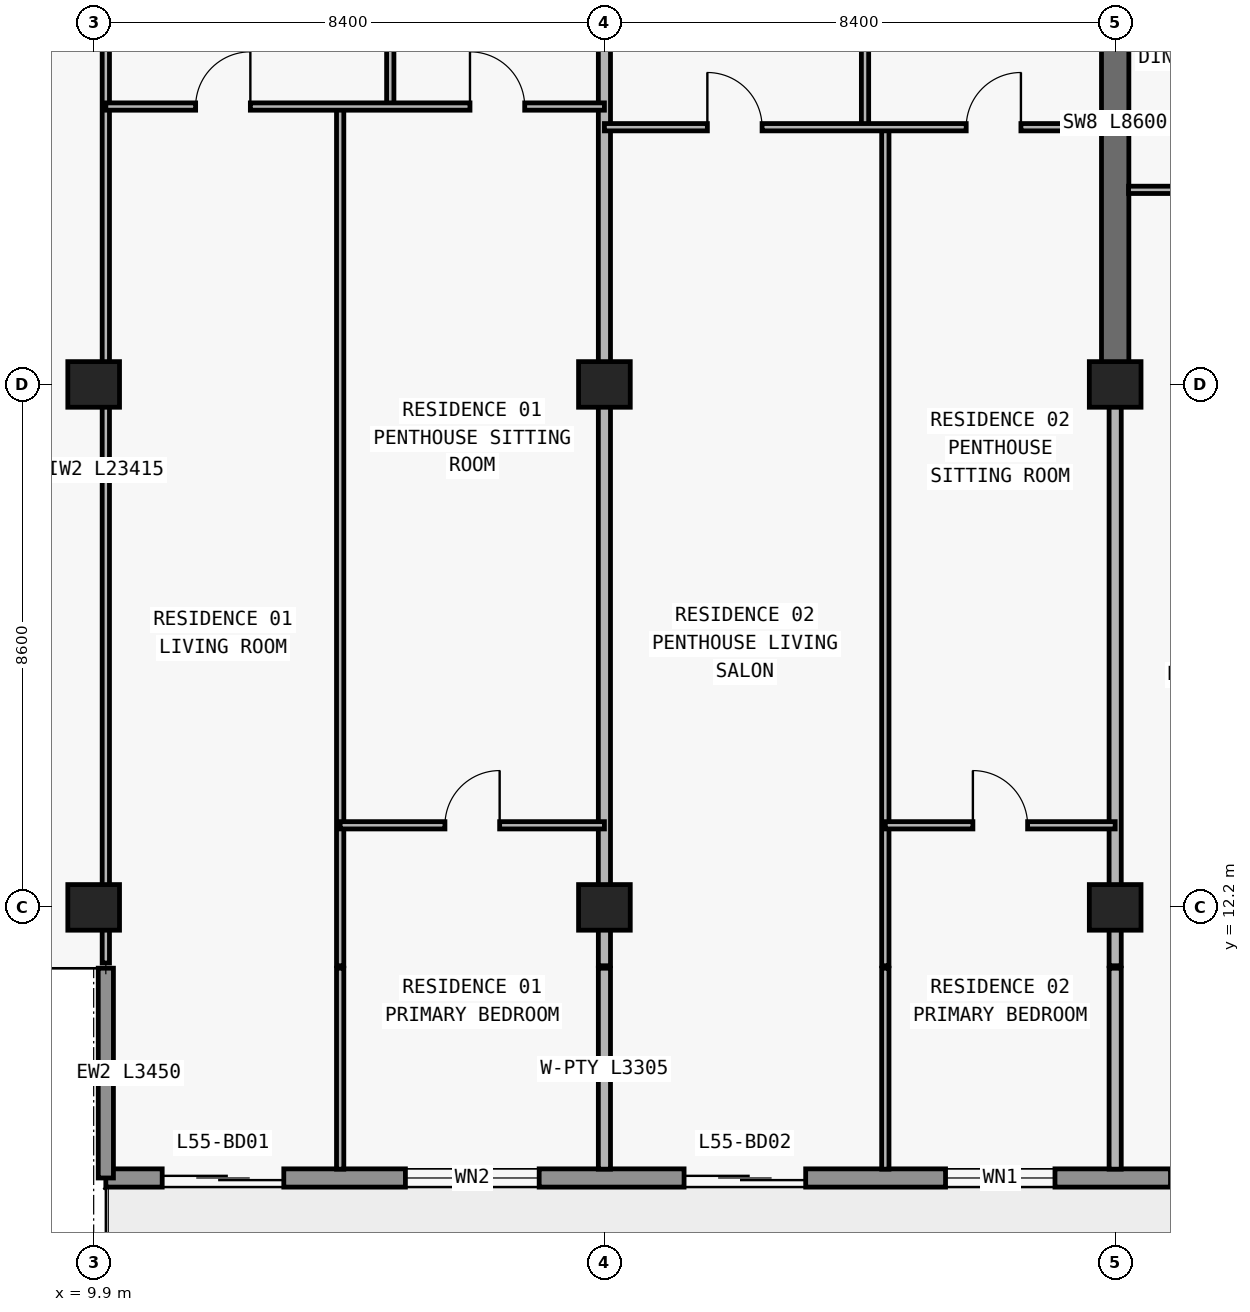
"""IFC4 building model, lengths in metres.
Left out: names, types, materials, properties, quantities, classifications, styles, units other than length and angle.
Written with IfcOpenShell. Run it as: python <this file> out.ifc"""

import sys

from ifc_helpers import new_model, si_unit, direction, frame, frame_2d, origin, origin_2d, place, context, subcontext, project, spatial, rectangle, extrude, element, fill, save


model = new_model("IFC4")
c1 = context("Model", 3, precision=1e-05, world=origin(), true_north=direction((0.0, 1.0)))
c2 = subcontext(c1, "Body", "Model", "MODEL_VIEW")
j1 = project(units=[si_unit("LENGTHUNIT", "METRE"), si_unit("PLANEANGLEUNIT", "RADIAN")], contexts=[c1])
p1 = place(None, origin())
s1 = spatial("IfcSite", under=j1, at=p1, CompositionType="ELEMENT")
p2 = place(p1, origin())
s2 = spatial("IfcBuilding", under=s1, at=p2, CompositionType="ELEMENT")
p3 = place(p2, frame((0.0, 0.0, 198.3)))
s3 = spatial("IfcBuildingStorey", under=s2, at=p3, CompositionType="ELEMENT", Elevation=198.3)
for number, where, z_axis, x_axis in (
    (1, (9.9, 12.2, 0.0), (0.0, 0.0, 1.0), (1.0, 0.0, 0.0)),
    (2, (18.3, 12.2, 0.0), (0.0, 0.0, 1.0), (1.0, 0.0, 0.0)),
    (3, (26.7, 12.2, 0.0), (0.0, 0.0, 1.0), (1.0, 0.0, 0.0)),
    (4, (9.9, 20.8, 0.0), (0.0, 0.0, 1.0), (1.0, 0.0, 0.0)),
    (5, (18.3, 20.8, 0.0), (0.0, 0.0, 1.0), (1.0, 0.0, 0.0)),
    (6, (26.7, 20.8, 0.0), (0.0, 0.0, 1.0), (1.0, 0.0, 0.0)),
):
    element("IfcColumn", number, at=place(p3, frame(where, z_axis=z_axis, x_axis=x_axis)), inside=s3, PredefinedType="COLUMN", context=c2, shape_type="SweptSolid", body=[
        extrude(rectangle(XDim=0.85, YDim=0.75, at=origin_2d()), origin(), (0.0, 0.0, 1.0), 3.05),
    ])
p4 = place(p3, frame((26.7, 20.8, 0.0), z_axis=(0.0, 0.0, 1.0), x_axis=(0.0, 1.0, 0.0)))
e7 = element("IfcWall", 7, at=p4, inside=s3, PredefinedType="SHEAR", context=c2, shape_type="SweptSolid", body=[
    extrude(rectangle(XDim=8.6, YDim=0.45, at=frame_2d((4.3, 0.0))), origin(), (0.0, 0.0, 1.0), 3.05),
])
p5 = place(p3, frame((67.7, 7.75, 0.0), z_axis=(0.0, 0.0, 1.0), x_axis=(-1.0, 0.0, 0.0)))
e8 = element("IfcWall", 8, at=p5, inside=s3, PredefinedType="STANDARD", context=c2, shape_type="SweptSolid", body=[
    extrude(rectangle(XDim=57.6, YDim=0.3, at=frame_2d((28.8, 0.0))), origin(), (0.0, 0.0, 1.0), 3.05),
])
p6 = place(p5, frame((54.673, 0.0, 0.0)))
e9 = element("IfcOpeningElement", 9, at=p6, cuts=e8, PredefinedType="OPENING", context=c2, shape_type="SweptSolid", body=[
    extrude(rectangle(XDim=2.0, YDim=2.3, at=frame_2d((1.0, 1.15))), frame((0.0, 0.16, 0.0), z_axis=(0.0, -1.0, 0.0), x_axis=(1.0, 0.0, 0.0)), (0.0, 0.0, 1.0), 0.32),
])
p7 = place(p5, frame((50.473, 0.0, 0.85)))
e10 = element("IfcOpeningElement", 10, at=p7, cuts=e8, PredefinedType="OPENING", context=c2, shape_type="SweptSolid", body=[
    extrude(rectangle(XDim=2.2, YDim=1.55, at=frame_2d((1.1, 0.775))), frame((0.0, 0.16, 0.0), z_axis=(0.0, -1.0, 0.0), x_axis=(1.0, 0.0, 0.0)), (0.0, 0.0, 1.0), 0.32),
])
p8 = place(p5, frame((46.09, 0.0, 0.0)))
e11 = element("IfcOpeningElement", 11, at=p8, cuts=e8, PredefinedType="OPENING", context=c2, shape_type="SweptSolid", body=[
    extrude(rectangle(XDim=2.0, YDim=2.3, at=frame_2d((1.0, 1.15))), frame((0.0, 0.16, 0.0), z_axis=(0.0, -1.0, 0.0), x_axis=(1.0, 0.0, 0.0)), (0.0, 0.0, 1.0), 0.32),
])
p9 = place(p5, frame((41.99, 0.0, 0.85)))
e12 = element("IfcOpeningElement", 12, at=p9, cuts=e8, PredefinedType="OPENING", context=c2, shape_type="SweptSolid", body=[
    extrude(rectangle(XDim=1.8, YDim=1.55, at=frame_2d((0.9, 0.775))), frame((0.0, 0.16, 0.0), z_axis=(0.0, -1.0, 0.0), x_axis=(1.0, 0.0, 0.0)), (0.0, 0.0, 1.0), 0.32),
])
p10 = place(p5, frame((38.09, 0.0, 0.0)))
e13 = element("IfcOpeningElement", 13, at=p10, cuts=e8, PredefinedType="OPENING", context=c2, shape_type="SweptSolid", body=[
    extrude(rectangle(XDim=2.0, YDim=2.3, at=frame_2d((1.0, 1.15))), frame((0.0, 0.16, 0.0), z_axis=(0.0, -1.0, 0.0), x_axis=(1.0, 0.0, 0.0)), (0.0, 0.0, 1.0), 0.32),
])
p11 = place(p5, frame((33.41, 0.0, 0.65)))
e14 = element("IfcOpeningElement", 14, at=p11, cuts=e8, PredefinedType="OPENING", context=c2, shape_type="SweptSolid", body=[
    extrude(rectangle(XDim=2.6, YDim=1.85, at=frame_2d((1.3, 0.925))), frame((0.0, 0.16, 0.0), z_axis=(0.0, -1.0, 0.0), x_axis=(1.0, 0.0, 0.0)), (0.0, 0.0, 1.0), 0.32),
])
p12 = place(p5, frame((27.7, 0.0, 0.85)))
e15 = element("IfcOpeningElement", 15, at=p12, cuts=e8, PredefinedType="OPENING", context=c2, shape_type="SweptSolid", body=[
    extrude(rectangle(XDim=2.2, YDim=1.55, at=frame_2d((1.1, 0.775))), frame((0.0, 0.16, 0.0), z_axis=(0.0, -1.0, 0.0), x_axis=(1.0, 0.0, 0.0)), (0.0, 0.0, 1.0), 0.32),
])
p13 = place(p5, frame((19.7, 0.0, 0.85)))
e16 = element("IfcOpeningElement", 16, at=p13, cuts=e8, PredefinedType="OPENING", context=c2, shape_type="SweptSolid", body=[
    extrude(rectangle(XDim=2.2, YDim=1.55, at=frame_2d((1.1, 0.775))), frame((0.0, 0.16, 0.0), z_axis=(0.0, -1.0, 0.0), x_axis=(1.0, 0.0, 0.0)), (0.0, 0.0, 1.0), 0.32),
])
p14 = place(p5, frame((13.69, 0.0, 0.0)))
e17 = element("IfcOpeningElement", 17, at=p14, cuts=e8, PredefinedType="OPENING", context=c2, shape_type="SweptSolid", body=[
    extrude(rectangle(XDim=2.0, YDim=2.3, at=frame_2d((1.0, 1.15))), frame((0.0, 0.16, 0.0), z_axis=(0.0, -1.0, 0.0), x_axis=(1.0, 0.0, 0.0)), (0.0, 0.0, 1.0), 0.32),
])
p15 = place(p5, frame((9.01, 0.0, 0.65)))
e18 = element("IfcOpeningElement", 18, at=p15, cuts=e8, PredefinedType="OPENING", context=c2, shape_type="SweptSolid", body=[
    extrude(rectangle(XDim=2.6, YDim=1.85, at=frame_2d((1.3, 0.925))), frame((0.0, 0.16, 0.0), z_axis=(0.0, -1.0, 0.0), x_axis=(1.0, 0.0, 0.0)), (0.0, 0.0, 1.0), 0.32),
])
p16 = place(p5, frame((3.0, 0.0, 0.85)))
e19 = element("IfcOpeningElement", 19, at=p16, cuts=e8, PredefinedType="OPENING", context=c2, shape_type="SweptSolid", body=[
    extrude(rectangle(XDim=2.2, YDim=1.55, at=frame_2d((1.1, 0.775))), frame((0.0, 0.16, 0.0), z_axis=(0.0, -1.0, 0.0), x_axis=(1.0, 0.0, 0.0)), (0.0, 0.0, 1.0), 0.32),
])
p17 = place(p3, frame((10.1, 11.2, 0.0), z_axis=(0.0, 0.0, 1.0), x_axis=(0.0, -1.0, 0.0)))
e20 = element("IfcWall", 20, at=p17, inside=s3, PredefinedType="ELEMENTEDWALL", context=c2, shape_type="SweptSolid", body=[
    extrude(rectangle(XDim=3.45, YDim=0.25, at=frame_2d((1.725, 0.0))), origin(), (0.0, 0.0, 1.0), 3.05),
])
p18 = place(p3, frame((10.1, 11.285, 0.0), z_axis=(0.0, 0.0, 1.0), x_axis=(0.0, 1.0, 0.0)))
e21 = element("IfcWall", 21, at=p18, inside=s3, PredefinedType="PARTITIONING", context=c2, shape_type="SweptSolid", body=[
    extrude(rectangle(XDim=23.415, YDim=0.12, at=frame_2d((11.708, 0.0))), origin(), (0.0, 0.0, 1.0), 2.263),
])
p19 = place(p18, frame((16.21, 0.0, 0.0)))
e22 = element("IfcOpeningElement", 22, at=p19, cuts=e21, PredefinedType="OPENING", context=c2, shape_type="SweptSolid", body=[
    extrude(rectangle(XDim=0.9, YDim=2.15, at=frame_2d((0.45, 1.075))), frame((0.0, 0.07, 0.0), z_axis=(0.0, -1.0, 0.0), x_axis=(1.0, 0.0, 0.0)), (0.0, 0.0, 1.0), 0.14),
])
p20 = place(p3, frame((13.954, 7.895, 0.0), z_axis=(0.0, 0.0, 1.0), x_axis=(0.0, 1.0, 0.0)))
e23 = element("IfcWall", 23, at=p20, inside=s3, PredefinedType="PARTITIONING", context=c2, shape_type="SweptSolid", body=[
    extrude(rectangle(XDim=3.305, YDim=0.12, at=frame_2d((1.652, 0.0))), origin(), (0.0, 0.0, 1.0), 3.05),
])
p21 = place(p3, frame((13.954, 11.24, 0.0), z_axis=(0.0, 0.0, 1.0), x_axis=(0.0, 1.0, 0.0)))
e24 = element("IfcWall", 24, at=p21, inside=s3, PredefinedType="PARTITIONING", context=c2, shape_type="SweptSolid", body=[
    extrude(rectangle(XDim=14.13, YDim=0.12, at=frame_2d((7.065, 0.0))), origin(), (0.0, 0.0, 1.0), 2.725),
])
p22 = place(p3, frame((14.778, 25.37, 0.0), z_axis=(0.0, 0.0, 1.0), x_axis=(0.0, 1.0, 0.0)))
e25 = element("IfcWall", 25, at=p22, inside=s3, PredefinedType="PARTITIONING", context=c2, shape_type="SweptSolid", body=[
    extrude(rectangle(XDim=5.15, YDim=0.12, at=frame_2d((2.575, 0.0))), origin(), (0.0, 0.0, 1.0), 3.05),
])
p23 = place(p22, frame((2.125, 0.0, 0.0)))
e26 = element("IfcOpeningElement", 26, at=p23, cuts=e25, PredefinedType="OPENING", context=c2, shape_type="SweptSolid", body=[
    extrude(rectangle(XDim=0.9, YDim=2.15, at=frame_2d((0.45, 1.075))), frame((0.0, 0.07, 0.0), z_axis=(0.0, -1.0, 0.0), x_axis=(1.0, 0.0, 0.0)), (0.0, 0.0, 1.0), 0.14),
])
p24 = place(p3, frame((18.3, 7.895, 0.0), z_axis=(0.0, 0.0, 1.0), x_axis=(0.0, 1.0, 0.0)))
e27 = element("IfcWall", 27, at=p24, inside=s3, PredefinedType="PARTITIONING", context=c2, shape_type="SweptSolid", body=[
    extrude(rectangle(XDim=3.305, YDim=0.2, at=frame_2d((1.652, 0.0))), origin(), (0.0, 0.0, 1.0), 3.05),
])
p25 = place(p3, frame((18.3, 11.24, 0.0), z_axis=(0.0, 0.0, 1.0), x_axis=(0.0, 1.0, 0.0)))
e28 = element("IfcWall", 28, at=p25, inside=s3, PredefinedType="PARTITIONING", context=c2, shape_type="SweptSolid", body=[
    extrude(rectangle(XDim=23.46, YDim=0.2, at=frame_2d((11.73, 0.0))), origin(), (0.0, 0.0, 1.0), 2.263),
])
p26 = place(p3, frame((22.586, 25.03, 0.0), z_axis=(0.0, 0.0, 1.0), x_axis=(0.0, 1.0, 0.0)))
e29 = element("IfcWall", 29, at=p26, inside=s3, PredefinedType="PARTITIONING", context=c2, shape_type="SweptSolid", body=[
    extrude(rectangle(XDim=5.15, YDim=0.12, at=frame_2d((2.575, 0.0))), origin(), (0.0, 0.0, 1.0), 2.725),
])
p27 = place(p26, frame((2.125, 0.0, 0.0)))
e30 = element("IfcOpeningElement", 30, at=p27, cuts=e29, PredefinedType="OPENING", context=c2, shape_type="SweptSolid", body=[
    extrude(rectangle(XDim=0.9, YDim=2.15, at=frame_2d((0.45, 1.075))), frame((0.0, 0.07, 0.0), z_axis=(0.0, -1.0, 0.0), x_axis=(1.0, 0.0, 0.0)), (0.0, 0.0, 1.0), 0.14),
])
p28 = place(p3, frame((22.92, 7.895, 0.0), z_axis=(0.0, 0.0, 1.0), x_axis=(0.0, 1.0, 0.0)))
e31 = element("IfcWall", 31, at=p28, inside=s3, PredefinedType="PARTITIONING", context=c2, shape_type="SweptSolid", body=[
    extrude(rectangle(XDim=3.305, YDim=0.12, at=frame_2d((1.652, 0.0))), origin(), (0.0, 0.0, 1.0), 3.05),
])
p29 = place(p3, frame((22.92, 11.24, 0.0), z_axis=(0.0, 0.0, 1.0), x_axis=(0.0, 1.0, 0.0)))
e32 = element("IfcWall", 32, at=p29, inside=s3, PredefinedType="PARTITIONING", context=c2, shape_type="SweptSolid", body=[
    extrude(rectangle(XDim=13.79, YDim=0.12, at=frame_2d((6.895, 0.0))), origin(), (0.0, 0.0, 1.0), 3.05),
])
p30 = place(p3, frame((26.7, 7.895, 0.0), z_axis=(0.0, 0.0, 1.0), x_axis=(0.0, 1.0, 0.0)))
e33 = element("IfcWall", 33, at=p30, inside=s3, PredefinedType="PARTITIONING", context=c2, shape_type="SweptSolid", body=[
    extrude(rectangle(XDim=3.305, YDim=0.2, at=frame_2d((1.652, 0.0))), origin(), (0.0, 0.0, 1.0), 3.05),
])
p31 = place(p3, frame((26.7, 11.24, 0.0), z_axis=(0.0, 0.0, 1.0), x_axis=(0.0, 1.0, 0.0)))
e34 = element("IfcWall", 34, at=p31, inside=s3, PredefinedType="PARTITIONING", context=c2, shape_type="SweptSolid", body=[
    extrude(rectangle(XDim=9.555, YDim=0.2, at=frame_2d((4.777, 0.0))), origin(), (0.0, 0.0, 1.0), 2.263),
])
p32 = place(p3, frame((13.954, 13.55, 0.0), z_axis=(0.0, 0.0, 1.0), x_axis=(1.0, 0.0, 0.0)))
e35 = element("IfcWall", 35, at=p32, inside=s3, PredefinedType="PARTITIONING", context=c2, shape_type="SweptSolid", body=[
    extrude(rectangle(XDim=4.346, YDim=0.12, at=frame_2d((2.173, 0.0))), origin(), (0.0, 0.0, 1.0), 3.05),
])
p33 = place(p32, frame((1.723, 0.0, 0.0)))
e36 = element("IfcOpeningElement", 36, at=p33, cuts=e35, PredefinedType="OPENING", context=c2, shape_type="SweptSolid", body=[
    extrude(rectangle(XDim=0.9, YDim=2.15, at=frame_2d((0.45, 1.075))), frame((0.0, 0.07, 0.0), z_axis=(0.0, -1.0, 0.0), x_axis=(1.0, 0.0, 0.0)), (0.0, 0.0, 1.0), 0.14),
])
p34 = place(p3, frame((22.92, 13.55, 0.0), z_axis=(0.0, 0.0, 1.0), x_axis=(1.0, 0.0, 0.0)))
e37 = element("IfcWall", 37, at=p34, inside=s3, PredefinedType="PARTITIONING", context=c2, shape_type="SweptSolid", body=[
    extrude(rectangle(XDim=3.78, YDim=0.12, at=frame_2d((1.89, 0.0))), origin(), (0.0, 0.0, 1.0), 3.05),
])
p35 = place(p34, frame((1.44, 0.0, 0.0)))
e38 = element("IfcOpeningElement", 38, at=p35, cuts=e37, PredefinedType="OPENING", context=c2, shape_type="SweptSolid", body=[
    extrude(rectangle(XDim=0.9, YDim=2.15, at=frame_2d((0.45, 1.075))), frame((0.0, 0.07, 0.0), z_axis=(0.0, -1.0, 0.0), x_axis=(1.0, 0.0, 0.0)), (0.0, 0.0, 1.0), 0.14),
])
p36 = place(p3, frame((26.92, 24.0, 0.0), z_axis=(0.0, 0.0, 1.0), x_axis=(1.0, 0.0, 0.0)))
e39 = element("IfcWall", 39, at=p36, inside=s3, PredefinedType="PARTITIONING", context=c2, shape_type="SweptSolid", body=[
    extrude(rectangle(XDim=8.18, YDim=0.12, at=frame_2d((4.09, 0.0))), origin(), (0.0, 0.0, 1.0), 3.05),
])
p37 = place(p36, frame((1.33, 0.0, 0.0)))
e40 = element("IfcOpeningElement", 40, at=p37, cuts=e39, PredefinedType="OPENING", context=c2, shape_type="SweptSolid", body=[
    extrude(rectangle(XDim=0.9, YDim=2.15, at=frame_2d((0.45, 1.075))), frame((0.0, 0.07, 0.0), z_axis=(0.0, -1.0, 0.0), x_axis=(1.0, 0.0, 0.0)), (0.0, 0.0, 1.0), 0.14),
])
p38 = place(p3, frame((18.3, 25.03, 0.0), z_axis=(0.0, 0.0, 1.0), x_axis=(1.0, 0.0, 0.0)))
e41 = element("IfcWall", 41, at=p38, inside=s3, PredefinedType="PARTITIONING", context=c2, shape_type="SweptSolid", body=[
    extrude(rectangle(XDim=8.18, YDim=0.12, at=frame_2d((4.09, 0.0))), origin(), (0.0, 0.0, 1.0), 3.05),
])
p39 = place(p38, frame((1.693, 0.0, 0.0)))
e42 = element("IfcOpeningElement", 42, at=p39, cuts=e41, PredefinedType="OPENING", context=c2, shape_type="SweptSolid", body=[
    extrude(rectangle(XDim=0.9, YDim=2.15, at=frame_2d((0.45, 1.075))), frame((0.0, 0.07, 0.0), z_axis=(0.0, -1.0, 0.0), x_axis=(1.0, 0.0, 0.0)), (0.0, 0.0, 1.0), 0.14),
])
p40 = place(p38, frame((5.95, 0.0, 0.0)))
e43 = element("IfcOpeningElement", 43, at=p40, cuts=e41, PredefinedType="OPENING", context=c2, shape_type="SweptSolid", body=[
    extrude(rectangle(XDim=0.9, YDim=2.15, at=frame_2d((0.45, 1.075))), frame((0.0, 0.07, 0.0), z_axis=(0.0, -1.0, 0.0), x_axis=(1.0, 0.0, 0.0)), (0.0, 0.0, 1.0), 0.14),
])
p41 = place(p3, frame((10.1, 25.37, 0.0), z_axis=(0.0, 0.0, 1.0), x_axis=(1.0, 0.0, 0.0)))
e44 = element("IfcWall", 44, at=p41, inside=s3, PredefinedType="PARTITIONING", context=c2, shape_type="SweptSolid", body=[
    extrude(rectangle(XDim=8.2, YDim=0.12, at=frame_2d((4.1, 0.0))), origin(), (0.0, 0.0, 1.0), 3.05),
])
p42 = place(p41, frame((1.477, 0.0, 0.0)))
e45 = element("IfcOpeningElement", 45, at=p42, cuts=e44, PredefinedType="OPENING", context=c2, shape_type="SweptSolid", body=[
    extrude(rectangle(XDim=0.9, YDim=2.15, at=frame_2d((0.45, 1.075))), frame((0.0, 0.07, 0.0), z_axis=(0.0, -1.0, 0.0), x_axis=(1.0, 0.0, 0.0)), (0.0, 0.0, 1.0), 0.14),
])
p43 = place(p41, frame((5.989, 0.0, 0.0)))
e46 = element("IfcOpeningElement", 46, at=p43, cuts=e44, PredefinedType="OPENING", context=c2, shape_type="SweptSolid", body=[
    extrude(rectangle(XDim=0.9, YDim=2.15, at=frame_2d((0.45, 1.075))), frame((0.0, 0.07, 0.0), z_axis=(0.0, -1.0, 0.0), x_axis=(1.0, 0.0, 0.0)), (0.0, 0.0, 1.0), 0.14),
])
p44 = place(p6, origin())
e47 = element("IfcDoor", 47, at=p44, inside=s3, OperationType="DOUBLE_DOOR_SLIDING", PredefinedType="DOOR", context=c2, shape_type="SweptSolid", body=[
    extrude(rectangle(XDim=2.0, YDim=2.3, at=frame_2d((1.0, 1.15))), frame((0.0, 0.025, 0.0), z_axis=(0.0, -1.0, 0.0), x_axis=(1.0, 0.0, 0.0)), (0.0, 0.0, 1.0), 0.05),
])
fill(e9, e47)
p45 = place(p7, origin())
e48 = element("IfcWindow", 48, at=p45, inside=s3, PartitioningType="SINGLE_PANEL", PredefinedType="WINDOW", context=c2, shape_type="SweptSolid", body=[
    extrude(rectangle(XDim=2.2, YDim=1.55, at=frame_2d((1.1, 0.775))), frame((0.0, 0.03, 0.0), z_axis=(0.0, -1.0, 0.0), x_axis=(1.0, 0.0, 0.0)), (0.0, 0.0, 1.0), 0.06),
])
fill(e10, e48)
p46 = place(p8, origin())
e49 = element("IfcDoor", 49, at=p46, inside=s3, OperationType="DOUBLE_DOOR_SLIDING", PredefinedType="DOOR", context=c2, shape_type="SweptSolid", body=[
    extrude(rectangle(XDim=2.0, YDim=2.3, at=frame_2d((1.0, 1.15))), frame((0.0, 0.025, 0.0), z_axis=(0.0, -1.0, 0.0), x_axis=(1.0, 0.0, 0.0)), (0.0, 0.0, 1.0), 0.05),
])
fill(e11, e49)
p47 = place(p9, origin())
e50 = element("IfcWindow", 50, at=p47, inside=s3, PartitioningType="SINGLE_PANEL", PredefinedType="WINDOW", context=c2, shape_type="SweptSolid", body=[
    extrude(rectangle(XDim=1.8, YDim=1.55, at=frame_2d((0.9, 0.775))), frame((0.0, 0.03, 0.0), z_axis=(0.0, -1.0, 0.0), x_axis=(1.0, 0.0, 0.0)), (0.0, 0.0, 1.0), 0.06),
])
fill(e12, e50)
p48 = place(p42, origin())
e51 = element("IfcDoor", 51, at=p48, inside=s3, OperationType="SINGLE_SWING_RIGHT", PredefinedType="DOOR", context=c2, shape_type="SweptSolid", body=[
    extrude(rectangle(XDim=0.9, YDim=2.15, at=frame_2d((0.45, 1.075))), frame((0.0, 0.025, 0.0), z_axis=(0.0, -1.0, 0.0), x_axis=(1.0, 0.0, 0.0)), (0.0, 0.0, 1.0), 0.05),
])
fill(e45, e51)
p49 = place(p43, origin())
e52 = element("IfcDoor", 52, at=p49, inside=s3, OperationType="SINGLE_SWING_LEFT", PredefinedType="DOOR", context=c2, shape_type="SweptSolid", body=[
    extrude(rectangle(XDim=0.9, YDim=2.15, at=frame_2d((0.45, 1.075))), frame((0.0, 0.025, 0.0), z_axis=(0.0, -1.0, 0.0), x_axis=(1.0, 0.0, 0.0)), (0.0, 0.0, 1.0), 0.05),
])
fill(e46, e52)
p50 = place(p33, origin())
e53 = element("IfcDoor", 53, at=p50, inside=s3, OperationType="SINGLE_SWING_RIGHT", PredefinedType="DOOR", context=c2, shape_type="SweptSolid", body=[
    extrude(rectangle(XDim=0.9, YDim=2.15, at=frame_2d((0.45, 1.075))), frame((0.0, 0.025, 0.0), z_axis=(0.0, -1.0, 0.0), x_axis=(1.0, 0.0, 0.0)), (0.0, 0.0, 1.0), 0.05),
])
fill(e36, e53)
p51 = place(p39, origin())
e54 = element("IfcDoor", 54, at=p51, inside=s3, OperationType="SINGLE_SWING_LEFT", PredefinedType="DOOR", context=c2, shape_type="SweptSolid", body=[
    extrude(rectangle(XDim=0.9, YDim=2.15, at=frame_2d((0.45, 1.075))), frame((0.0, 0.025, 0.0), z_axis=(0.0, -1.0, 0.0), x_axis=(1.0, 0.0, 0.0)), (0.0, 0.0, 1.0), 0.05),
])
fill(e42, e54)
p52 = place(p40, origin())
e55 = element("IfcDoor", 55, at=p52, inside=s3, OperationType="SINGLE_SWING_RIGHT", PredefinedType="DOOR", context=c2, shape_type="SweptSolid", body=[
    extrude(rectangle(XDim=0.9, YDim=2.15, at=frame_2d((0.45, 1.075))), frame((0.0, 0.025, 0.0), z_axis=(0.0, -1.0, 0.0), x_axis=(1.0, 0.0, 0.0)), (0.0, 0.0, 1.0), 0.05),
])
fill(e43, e55)
p53 = place(p35, origin())
e56 = element("IfcDoor", 56, at=p53, inside=s3, OperationType="SINGLE_SWING_LEFT", PredefinedType="DOOR", context=c2, shape_type="SweptSolid", body=[
    extrude(rectangle(XDim=0.9, YDim=2.15, at=frame_2d((0.45, 1.075))), frame((0.0, 0.025, 0.0), z_axis=(0.0, -1.0, 0.0), x_axis=(1.0, 0.0, 0.0)), (0.0, 0.0, 1.0), 0.05),
])
fill(e38, e56)
save(model, sys.argv[1])
